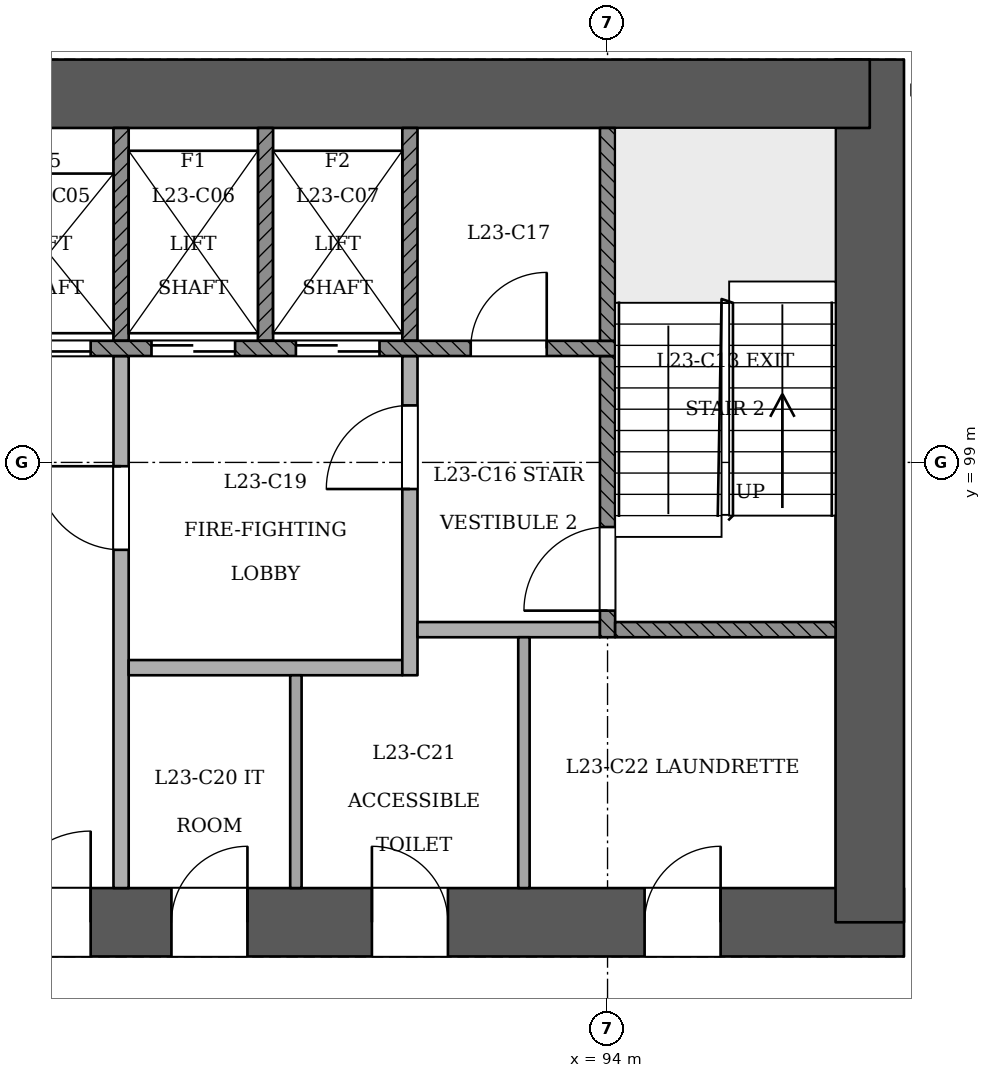
"""IFC4 building model, lengths in metres.
Left out: names, types, materials, properties, quantities, classifications, styles, units other than length and angle.
Written with IfcOpenShell. Run it as: python <this file> out.ifc"""

import sys

from ifc_helpers import new_model, si_unit, direction, frame, frame_2d, origin, place, context, subcontext, project, spatial, rectangle, extrude, element, fill, save


model = new_model("IFC4")
c1 = context("Model", 3, precision=1e-05, world=origin(), true_north=direction((0.0, 1.0)))
c2 = subcontext(c1, "Body", "Model", "MODEL_VIEW")
j1 = project(units=[si_unit("LENGTHUNIT", "METRE"), si_unit("PLANEANGLEUNIT", "RADIAN")], contexts=[c1])
p1 = place(None, origin())
s1 = spatial("IfcSite", under=j1, at=p1, CompositionType="ELEMENT")
p2 = place(p1, origin())
s2 = spatial("IfcBuilding", under=s1, at=p2, CompositionType="ELEMENT")
p3 = place(p2, frame((0.0, 0.0, 91.8)))
s3 = spatial("IfcBuildingStorey", under=s2, at=p3, CompositionType="ELEMENT", Elevation=91.8)
p4 = place(p3, frame((72.55, 92.95, 0.0), z_axis=(0.0, 0.0, 1.0), x_axis=(1.0, 0.0, 0.0)))
e1 = element("IfcWall", 1, at=p4, inside=s3, PredefinedType="SHEAR", context=c2, shape_type="SweptSolid", body=[
    extrude(rectangle(XDim=25.35, YDim=0.9, at=frame_2d((12.675, 0.0))), origin(), (0.0, 0.0, 1.0), 3.6),
])
p5 = place(p4, frame((1.25, 0.0, 0.0)))
e2 = element("IfcOpeningElement", 2, at=p5, cuts=e1, PredefinedType="OPENING", context=c2, shape_type="SweptSolid", body=[
    extrude(rectangle(XDim=1.2, YDim=2.1, at=frame_2d((0.6, 1.05))), frame((0.0, 0.46, 0.0), z_axis=(0.0, -1.0, 0.0), x_axis=(1.0, 0.0, 0.0)), (0.0, 0.0, 1.0), 0.921),
])
p6 = place(p4, frame((3.45, 0.0, 0.0)))
e3 = element("IfcOpeningElement", 3, at=p6, cuts=e1, PredefinedType="OPENING", context=c2, shape_type="SweptSolid", body=[
    extrude(rectangle(XDim=1.2, YDim=2.1, at=frame_2d((0.6, 1.05))), frame((0.0, 0.46, 0.0), z_axis=(0.0, -1.0, 0.0), x_axis=(1.0, 0.0, 0.0)), (0.0, 0.0, 1.0), 0.921),
])
p7 = place(p4, frame((13.45, 0.0, 0.0)))
e4 = element("IfcOpeningElement", 4, at=p7, cuts=e1, PredefinedType="OPENING", context=c2, shape_type="SweptSolid", body=[
    extrude(rectangle(XDim=1.2, YDim=2.1, at=frame_2d((0.6, 1.05))), frame((0.0, 0.46, 0.0), z_axis=(0.0, -1.0, 0.0), x_axis=(1.0, 0.0, 0.0)), (0.0, 0.0, 1.0), 0.921),
])
p8 = place(p4, frame((15.712, 0.0, 0.0)))
e5 = element("IfcOpeningElement", 5, at=p8, cuts=e1, PredefinedType="OPENING", context=c2, shape_type="SweptSolid", body=[
    extrude(rectangle(XDim=1.0, YDim=2.1, at=frame_2d((0.5, 1.05))), frame((0.0, 0.46, 0.0), z_axis=(0.0, -1.0, 0.0), x_axis=(1.0, 0.0, 0.0)), (0.0, 0.0, 1.0), 0.921),
])
p9 = place(p4, frame((18.35, 0.0, 0.0)))
e6 = element("IfcOpeningElement", 6, at=p9, cuts=e1, PredefinedType="OPENING", context=c2, shape_type="SweptSolid", body=[
    extrude(rectangle(XDim=1.0, YDim=2.1, at=frame_2d((0.5, 1.05))), frame((0.0, 0.46, 0.0), z_axis=(0.0, -1.0, 0.0), x_axis=(1.0, 0.0, 0.0)), (0.0, 0.0, 1.0), 0.921),
])
p10 = place(p4, frame((21.938, 0.0, 0.0)))
e7 = element("IfcOpeningElement", 7, at=p10, cuts=e1, PredefinedType="OPENING", context=c2, shape_type="SweptSolid", body=[
    extrude(rectangle(XDim=1.0, YDim=2.1, at=frame_2d((0.5, 1.05))), frame((0.0, 0.46, 0.0), z_axis=(0.0, -1.0, 0.0), x_axis=(1.0, 0.0, 0.0)), (0.0, 0.0, 1.0), 0.921),
])
p11 = place(p3, frame((97.45, 92.95, 0.0), z_axis=(0.0, 0.0, 1.0), x_axis=(0.0, 1.0, 0.0)))
e8 = element("IfcWall", 8, at=p11, inside=s3, PredefinedType="SHEAR", context=c2, shape_type="SweptSolid", body=[
    extrude(rectangle(XDim=11.35, YDim=0.9, at=frame_2d((5.675, 0.0))), origin(), (0.0, 0.0, 1.0), 3.6),
])
p12 = place(p3, frame((97.45, 103.85, 0.0), z_axis=(0.0, 0.0, 1.0), x_axis=(-1.0, 0.0, 0.0)))
e9 = element("IfcWall", 9, at=p12, inside=s3, PredefinedType="SHEAR", context=c2, shape_type="SweptSolid", body=[
    extrude(rectangle(XDim=25.35, YDim=0.9, at=frame_2d((12.675, 0.0))), origin(), (0.0, 0.0, 1.0), 3.6),
])
p13 = place(p3, frame((85.554, 60.948, 0.0), z_axis=(0.0, 0.0, 1.0), x_axis=(0.500001382442, 0.86602460563, 0.0)))
e10 = element("IfcWall", 10, at=p13, inside=s3, PredefinedType="PARTITIONING", context=c2, shape_type="SweptSolid", body=[
    extrude(rectangle(XDim=42.252, YDim=0.15, at=frame_2d((21.126, 0.0))), origin(), (0.0, 0.0, 1.0), 2.9),
])
p14 = place(p13, frame((0.285, 0.0, 0.0)))
e11 = element("IfcOpeningElement", 11, at=p14, cuts=e10, PredefinedType="OPENING", context=c2, shape_type="SweptSolid", body=[
    extrude(rectangle(XDim=1.2, YDim=2.1, at=frame_2d((0.6, 1.05))), frame((0.0, 0.085, 0.0), z_axis=(0.0, -1.0, 0.0), x_axis=(1.0, 0.0, 0.0)), (0.0, 0.0, 1.0), 0.171),
])
p15 = place(p13, frame((3.731, 0.0, 0.0)))
e12 = element("IfcOpeningElement", 12, at=p15, cuts=e10, PredefinedType="OPENING", context=c2, shape_type="SweptSolid", body=[
    extrude(rectangle(XDim=1.0, YDim=2.1, at=frame_2d((0.5, 1.05))), frame((0.0, 0.085, 0.0), z_axis=(0.0, -1.0, 0.0), x_axis=(1.0, 0.0, 0.0)), (0.0, 0.0, 1.0), 0.171),
])
p16 = place(p13, frame((11.526, 0.0, 0.0)))
e13 = element("IfcOpeningElement", 13, at=p16, cuts=e10, PredefinedType="OPENING", context=c2, shape_type="SweptSolid", body=[
    extrude(rectangle(XDim=1.2, YDim=2.1, at=frame_2d((0.6, 1.05))), frame((0.0, 0.085, 0.0), z_axis=(0.0, -1.0, 0.0), x_axis=(1.0, 0.0, 0.0)), (0.0, 0.0, 1.0), 0.171),
])
p17 = place(p13, frame((18.376, 0.0, 0.0)))
e14 = element("IfcOpeningElement", 14, at=p17, cuts=e10, PredefinedType="OPENING", context=c2, shape_type="SweptSolid", body=[
    extrude(rectangle(XDim=1.0, YDim=2.1, at=frame_2d((0.5, 1.05))), frame((0.0, 0.085, 0.0), z_axis=(0.0, -1.0, 0.0), x_axis=(1.0, 0.0, 0.0)), (0.0, 0.0, 1.0), 0.171),
])
p18 = place(p13, frame((21.731, 0.0, 0.0)))
e15 = element("IfcOpeningElement", 15, at=p18, cuts=e10, PredefinedType="OPENING", context=c2, shape_type="SweptSolid", body=[
    extrude(rectangle(XDim=1.0, YDim=2.1, at=frame_2d((0.5, 1.05))), frame((0.0, 0.085, 0.0), z_axis=(0.0, -1.0, 0.0), x_axis=(1.0, 0.0, 0.0)), (0.0, 0.0, 1.0), 0.171),
])
p19 = place(p13, frame((27.376, 0.0, 0.0)))
e16 = element("IfcOpeningElement", 16, at=p19, cuts=e10, PredefinedType="OPENING", context=c2, shape_type="SweptSolid", body=[
    extrude(rectangle(XDim=1.0, YDim=2.1, at=frame_2d((0.5, 1.05))), frame((0.0, 0.085, 0.0), z_axis=(0.0, -1.0, 0.0), x_axis=(1.0, 0.0, 0.0)), (0.0, 0.0, 1.0), 0.171),
])
p20 = place(p13, frame((30.697, 0.0, 0.0)))
e17 = element("IfcOpeningElement", 17, at=p20, cuts=e10, PredefinedType="OPENING", context=c2, shape_type="SweptSolid", body=[
    extrude(rectangle(XDim=1.1, YDim=2.1, at=frame_2d((0.55, 1.05))), frame((0.0, 0.085, 0.0), z_axis=(0.0, -1.0, 0.0), x_axis=(1.0, 0.0, 0.0)), (0.0, 0.0, 1.0), 0.171),
])
p21 = place(p13, frame((37.976, 0.0, 0.0)))
e18 = element("IfcOpeningElement", 18, at=p21, cuts=e10, PredefinedType="OPENING", context=c2, shape_type="SweptSolid", body=[
    extrude(rectangle(XDim=1.2, YDim=2.1, at=frame_2d((0.6, 1.05))), frame((0.0, 0.085, 0.0), z_axis=(0.0, -1.0, 0.0), x_axis=(1.0, 0.0, 0.0)), (0.0, 0.0, 1.0), 0.171),
])
p22 = place(p3, frame((87.6, 93.4, 0.0), z_axis=(0.0, 0.0, 1.0), x_axis=(0.0, 1.0, 0.0)))
e19 = element("IfcWall", 19, at=p22, inside=s3, PredefinedType="PARTITIONING", context=c2, shape_type="SweptSolid", body=[
    extrude(rectangle(XDim=7.0, YDim=0.2, at=frame_2d((3.5, 0.0))), origin(), (0.0, 0.0, 1.0), 3.3),
])
p23 = place(p22, frame((4.45, 0.0, 0.0)))
e20 = element("IfcOpeningElement", 20, at=p23, cuts=e19, PredefinedType="OPENING", context=c2, shape_type="SweptSolid", body=[
    extrude(rectangle(XDim=1.1, YDim=2.1, at=frame_2d((0.55, 1.05))), frame((0.0, 0.11, 0.0), z_axis=(0.0, -1.0, 0.0), x_axis=(1.0, 0.0, 0.0)), (0.0, 0.0, 1.0), 0.221),
])
p24 = place(p3, frame((89.9, 93.4, 0.0), z_axis=(0.0, 0.0, 1.0), x_axis=(0.0, 1.0, 0.0)))
e21 = element("IfcWall", 21, at=p24, inside=s3, PredefinedType="PARTITIONING", context=c2, shape_type="SweptSolid", body=[
    extrude(rectangle(XDim=2.8, YDim=0.15, at=frame_2d((1.4, 0.0))), origin(), (0.0, 0.0, 1.0), 3.3),
])
p25 = place(p3, frame((92.9, 93.4, 0.0), z_axis=(0.0, 0.0, 1.0), x_axis=(0.0, 1.0, 0.0)))
e22 = element("IfcWall", 22, at=p25, inside=s3, PredefinedType="PARTITIONING", context=c2, shape_type="SweptSolid", body=[
    extrude(rectangle(XDim=3.3, YDim=0.15, at=frame_2d((1.65, 0.0))), origin(), (0.0, 0.0, 1.0), 3.3),
])
p26 = place(p3, frame((87.7, 96.3, 0.0), z_axis=(0.0, 0.0, 1.0), x_axis=(1.0, 0.0, 0.0)))
e23 = element("IfcWall", 23, at=p26, inside=s3, PredefinedType="PARTITIONING", context=c2, shape_type="SweptSolid", body=[
    extrude(rectangle(XDim=3.6, YDim=0.2, at=frame_2d((1.8, 0.0))), origin(), (0.0, 0.0, 1.0), 3.3),
])
p27 = place(p3, frame((91.4, 96.2, 0.0), z_axis=(0.0, 0.0, 1.0), x_axis=(0.0, 1.0, 0.0)))
e24 = element("IfcWall", 24, at=p27, inside=s3, PredefinedType="PARTITIONING", context=c2, shape_type="SweptSolid", body=[
    extrude(rectangle(XDim=4.2, YDim=0.2, at=frame_2d((2.1, 0.0))), origin(), (0.0, 0.0, 1.0), 3.3),
])
p28 = place(p27, frame((2.45, 0.0, 0.0)))
e25 = element("IfcOpeningElement", 25, at=p28, cuts=e24, PredefinedType="OPENING", context=c2, shape_type="SweptSolid", body=[
    extrude(rectangle(XDim=1.1, YDim=2.1, at=frame_2d((0.55, 1.05))), frame((0.0, 0.11, 0.0), z_axis=(0.0, -1.0, 0.0), x_axis=(1.0, 0.0, 0.0)), (0.0, 0.0, 1.0), 0.221),
])
p29 = place(p3, frame((91.5, 96.8, 0.0), z_axis=(0.0, 0.0, 1.0), x_axis=(1.0, 0.0, 0.0)))
e26 = element("IfcWall", 26, at=p29, inside=s3, PredefinedType="PARTITIONING", context=c2, shape_type="SweptSolid", body=[
    extrude(rectangle(XDim=2.4, YDim=0.2, at=frame_2d((1.2, 0.0))), origin(), (0.0, 0.0, 1.0), 3.3),
])
p30 = place(p3, frame((94.0, 96.7, 0.0), z_axis=(0.0, 0.0, 1.0), x_axis=(0.0, 1.0, 0.0)))
e27 = element("IfcWall", 27, at=p30, inside=s3, PredefinedType="SOLIDWALL", context=c2, shape_type="SweptSolid", body=[
    extrude(rectangle(XDim=3.7, YDim=0.2, at=frame_2d((1.85, 0.0))), origin(), (0.0, 0.0, 1.0), 3.3),
])
p31 = place(p30, frame((0.35, 0.0, 0.0)))
e28 = element("IfcOpeningElement", 28, at=p31, cuts=e27, PredefinedType="OPENING", context=c2, shape_type="SweptSolid", body=[
    extrude(rectangle(XDim=1.1, YDim=2.1, at=frame_2d((0.55, 1.05))), frame((0.0, 0.11, 0.0), z_axis=(0.0, -1.0, 0.0), x_axis=(1.0, 0.0, 0.0)), (0.0, 0.0, 1.0), 0.221),
])
p32 = place(p3, frame((94.1, 96.8, 0.0), z_axis=(0.0, 0.0, 1.0), x_axis=(1.0, 0.0, 0.0)))
e29 = element("IfcWall", 29, at=p32, inside=s3, PredefinedType="SOLIDWALL", context=c2, shape_type="SweptSolid", body=[
    extrude(rectangle(XDim=2.9, YDim=0.2, at=frame_2d((1.45, 0.0))), origin(), (0.0, 0.0, 1.0), 3.3),
])
p33 = place(p3, frame((75.9, 100.5, 0.0), z_axis=(0.0, 0.0, 1.0), x_axis=(1.0, 0.0, 0.0)))
e30 = element("IfcWall", 30, at=p33, inside=s3, PredefinedType="SOLIDWALL", context=c2, shape_type="SweptSolid", body=[
    extrude(rectangle(XDim=18.2, YDim=0.2, at=frame_2d((9.1, 0.0))), origin(), (0.0, 0.0, 1.0), 3.3),
])
p34 = place(p33, frame((2.6, 0.0, 0.0)))
e31 = element("IfcOpeningElement", 31, at=p34, cuts=e30, PredefinedType="OPENING", context=c2, shape_type="SweptSolid", body=[
    extrude(rectangle(XDim=1.1, YDim=2.1, at=frame_2d((0.55, 1.05))), frame((0.0, 0.11, 0.0), z_axis=(0.0, -1.0, 0.0), x_axis=(1.0, 0.0, 0.0)), (0.0, 0.0, 1.0), 0.221),
])
p35 = place(p33, frame((4.5, 0.0, 0.0)))
e32 = element("IfcOpeningElement", 32, at=p35, cuts=e30, PredefinedType="OPENING", context=c2, shape_type="SweptSolid", body=[
    extrude(rectangle(XDim=1.1, YDim=2.1, at=frame_2d((0.55, 1.05))), frame((0.0, 0.11, 0.0), z_axis=(0.0, -1.0, 0.0), x_axis=(1.0, 0.0, 0.0)), (0.0, 0.0, 1.0), 0.221),
])
p36 = place(p33, frame((6.4, 0.0, 0.0)))
e33 = element("IfcOpeningElement", 33, at=p36, cuts=e30, PredefinedType="OPENING", context=c2, shape_type="SweptSolid", body=[
    extrude(rectangle(XDim=1.1, YDim=2.1, at=frame_2d((0.55, 1.05))), frame((0.0, 0.11, 0.0), z_axis=(0.0, -1.0, 0.0), x_axis=(1.0, 0.0, 0.0)), (0.0, 0.0, 1.0), 0.221),
])
p37 = place(p33, frame((8.3, 0.0, 0.0)))
e34 = element("IfcOpeningElement", 34, at=p37, cuts=e30, PredefinedType="OPENING", context=c2, shape_type="SweptSolid", body=[
    extrude(rectangle(XDim=1.1, YDim=2.1, at=frame_2d((0.55, 1.05))), frame((0.0, 0.11, 0.0), z_axis=(0.0, -1.0, 0.0), x_axis=(1.0, 0.0, 0.0)), (0.0, 0.0, 1.0), 0.221),
])
p38 = place(p33, frame((10.2, 0.0, 0.0)))
e35 = element("IfcOpeningElement", 35, at=p38, cuts=e30, PredefinedType="OPENING", context=c2, shape_type="SweptSolid", body=[
    extrude(rectangle(XDim=1.1, YDim=2.1, at=frame_2d((0.55, 1.05))), frame((0.0, 0.11, 0.0), z_axis=(0.0, -1.0, 0.0), x_axis=(1.0, 0.0, 0.0)), (0.0, 0.0, 1.0), 0.221),
])
p39 = place(p33, frame((12.1, 0.0, 0.0)))
e36 = element("IfcOpeningElement", 36, at=p39, cuts=e30, PredefinedType="OPENING", context=c2, shape_type="SweptSolid", body=[
    extrude(rectangle(XDim=1.1, YDim=2.1, at=frame_2d((0.55, 1.05))), frame((0.0, 0.11, 0.0), z_axis=(0.0, -1.0, 0.0), x_axis=(1.0, 0.0, 0.0)), (0.0, 0.0, 1.0), 0.221),
])
p40 = place(p33, frame((14.0, 0.0, 0.0)))
e37 = element("IfcOpeningElement", 37, at=p40, cuts=e30, PredefinedType="OPENING", context=c2, shape_type="SweptSolid", body=[
    extrude(rectangle(XDim=1.1, YDim=2.1, at=frame_2d((0.55, 1.05))), frame((0.0, 0.11, 0.0), z_axis=(0.0, -1.0, 0.0), x_axis=(1.0, 0.0, 0.0)), (0.0, 0.0, 1.0), 0.221),
])
p41 = place(p33, frame((0.65, 0.0, 0.0)))
e38 = element("IfcOpeningElement", 38, at=p41, cuts=e30, PredefinedType="OPENING", context=c2, shape_type="SweptSolid", body=[
    extrude(rectangle(XDim=1.0, YDim=2.1, at=frame_2d((0.5, 1.05))), frame((0.0, 0.11, 0.0), z_axis=(0.0, -1.0, 0.0), x_axis=(1.0, 0.0, 0.0)), (0.0, 0.0, 1.0), 0.221),
])
p42 = place(p33, frame((16.3, 0.0, 0.0)))
e39 = element("IfcOpeningElement", 39, at=p42, cuts=e30, PredefinedType="OPENING", context=c2, shape_type="SweptSolid", body=[
    extrude(rectangle(XDim=1.0, YDim=2.1, at=frame_2d((0.5, 1.05))), frame((0.0, 0.11, 0.0), z_axis=(0.0, -1.0, 0.0), x_axis=(1.0, 0.0, 0.0)), (0.0, 0.0, 1.0), 0.221),
])
for number, where, z_axis, x_axis in (
    (40, (87.6, 100.6, 0.0), (0.0, 0.0, 1.0), (0.0, 1.0, 0.0)),
    (41, (89.5, 100.6, 0.0), (0.0, 0.0, 1.0), (0.0, 1.0, 0.0)),
    (42, (91.4, 100.6, 0.0), (0.0, 0.0, 1.0), (0.0, 1.0, 0.0)),
    (43, (94.0, 100.6, 0.0), (0.0, 0.0, 1.0), (0.0, 1.0, 0.0)),
):
    element("IfcWall", number, at=place(p3, frame(where, z_axis=z_axis, x_axis=x_axis)), inside=s3, PredefinedType="SOLIDWALL", context=c2, shape_type="SweptSolid", body=[
        extrude(rectangle(XDim=2.8, YDim=0.2, at=frame_2d((1.4, 0.0))), origin(), (0.0, 0.0, 1.0), 3.3),
    ])
p43 = place(p38, origin())
e44 = element("IfcDoor", 44, at=p43, inside=s3, OperationType="SLIDING_TO_RIGHT", PredefinedType="NOTDEFINED", context=c2, shape_type="SweptSolid", body=[
    extrude(rectangle(XDim=1.1, YDim=2.1, at=frame_2d((0.55, 1.05))), frame((0.0, 0.025, 0.0), z_axis=(0.0, -1.0, 0.0), x_axis=(1.0, 0.0, 0.0)), (0.0, 0.0, 1.0), 0.05),
])
fill(e35, e44)
p44 = place(p39, origin())
e45 = element("IfcDoor", 45, at=p44, inside=s3, OperationType="SLIDING_TO_RIGHT", PredefinedType="NOTDEFINED", context=c2, shape_type="SweptSolid", body=[
    extrude(rectangle(XDim=1.1, YDim=2.1, at=frame_2d((0.55, 1.05))), frame((0.0, 0.025, 0.0), z_axis=(0.0, -1.0, 0.0), x_axis=(1.0, 0.0, 0.0)), (0.0, 0.0, 1.0), 0.05),
])
fill(e36, e45)
p45 = place(p40, origin())
e46 = element("IfcDoor", 46, at=p45, inside=s3, OperationType="SLIDING_TO_LEFT", PredefinedType="NOTDEFINED", context=c2, shape_type="SweptSolid", body=[
    extrude(rectangle(XDim=1.1, YDim=2.1, at=frame_2d((0.55, 1.05))), frame((0.0, 0.025, 0.0), z_axis=(0.0, -1.0, 0.0), x_axis=(1.0, 0.0, 0.0)), (0.0, 0.0, 1.0), 0.05),
])
fill(e37, e46)
p46 = place(p31, origin())
e47 = element("IfcDoor", 47, at=p46, inside=s3, OperationType="SINGLE_SWING_LEFT", PredefinedType="NOTDEFINED", context=c2, shape_type="SweptSolid", body=[
    extrude(rectangle(XDim=1.1, YDim=2.1, at=frame_2d((0.55, 1.05))), frame((0.0, 0.025, 0.0), z_axis=(0.0, -1.0, 0.0), x_axis=(1.0, 0.0, 0.0)), (0.0, 0.0, 1.0), 0.05),
])
fill(e28, e47)
p47 = place(p23, origin())
e48 = element("IfcDoor", 48, at=p47, inside=s3, OperationType="SINGLE_SWING_RIGHT", PredefinedType="NOTDEFINED", context=c2, shape_type="SweptSolid", body=[
    extrude(rectangle(XDim=1.1, YDim=2.1, at=frame_2d((0.55, 1.05))), frame((0.0, 0.025, 0.0), z_axis=(0.0, -1.0, 0.0), x_axis=(1.0, 0.0, 0.0)), (0.0, 0.0, 1.0), 0.05),
])
fill(e20, e48)
p48 = place(p28, origin())
e49 = element("IfcDoor", 49, at=p48, inside=s3, OperationType="SINGLE_SWING_LEFT", PredefinedType="NOTDEFINED", context=c2, shape_type="SweptSolid", body=[
    extrude(rectangle(XDim=1.1, YDim=2.1, at=frame_2d((0.55, 1.05))), frame((0.0, 0.025, 0.0), z_axis=(0.0, -1.0, 0.0), x_axis=(1.0, 0.0, 0.0)), (0.0, 0.0, 1.0), 0.05),
])
fill(e25, e49)
p49 = place(p7, origin())
e50 = element("IfcDoor", 50, at=p49, inside=s3, OperationType="SINGLE_SWING_RIGHT", PredefinedType="NOTDEFINED", context=c2, shape_type="SweptSolid", body=[
    extrude(rectangle(XDim=1.2, YDim=2.1, at=frame_2d((0.6, 1.05))), frame((0.0, 0.025, 0.0), z_axis=(0.0, -1.0, 0.0), x_axis=(1.0, 0.0, 0.0)), (0.0, 0.0, 1.0), 0.05),
])
fill(e4, e50)
p50 = place(p42, origin())
e51 = element("IfcDoor", 51, at=p50, inside=s3, OperationType="SINGLE_SWING_RIGHT", PredefinedType="NOTDEFINED", context=c2, shape_type="SweptSolid", body=[
    extrude(rectangle(XDim=1.0, YDim=2.1, at=frame_2d((0.5, 1.05))), frame((0.0, 0.025, 0.0), z_axis=(0.0, -1.0, 0.0), x_axis=(1.0, 0.0, 0.0)), (0.0, 0.0, 1.0), 0.05),
])
fill(e39, e51)
p51 = place(p8, origin())
e52 = element("IfcDoor", 52, at=p51, inside=s3, OperationType="SINGLE_SWING_RIGHT", PredefinedType="NOTDEFINED", context=c2, shape_type="SweptSolid", body=[
    extrude(rectangle(XDim=1.0, YDim=2.1, at=frame_2d((0.5, 1.05))), frame((0.0, 0.025, 0.0), z_axis=(0.0, -1.0, 0.0), x_axis=(1.0, 0.0, 0.0)), (0.0, 0.0, 1.0), 0.05),
])
fill(e5, e52)
p52 = place(p9, origin())
e53 = element("IfcDoor", 53, at=p52, inside=s3, OperationType="SINGLE_SWING_LEFT", PredefinedType="NOTDEFINED", context=c2, shape_type="SweptSolid", body=[
    extrude(rectangle(XDim=1.0, YDim=2.1, at=frame_2d((0.5, 1.05))), frame((0.0, 0.025, 0.0), z_axis=(0.0, -1.0, 0.0), x_axis=(1.0, 0.0, 0.0)), (0.0, 0.0, 1.0), 0.05),
])
fill(e6, e53)
p53 = place(p10, origin())
e54 = element("IfcDoor", 54, at=p53, inside=s3, OperationType="SINGLE_SWING_RIGHT", PredefinedType="NOTDEFINED", context=c2, shape_type="SweptSolid", body=[
    extrude(rectangle(XDim=1.0, YDim=2.1, at=frame_2d((0.5, 1.05))), frame((0.0, 0.025, 0.0), z_axis=(0.0, -1.0, 0.0), x_axis=(1.0, 0.0, 0.0)), (0.0, 0.0, 1.0), 0.05),
])
fill(e7, e54)
save(model, sys.argv[1])
